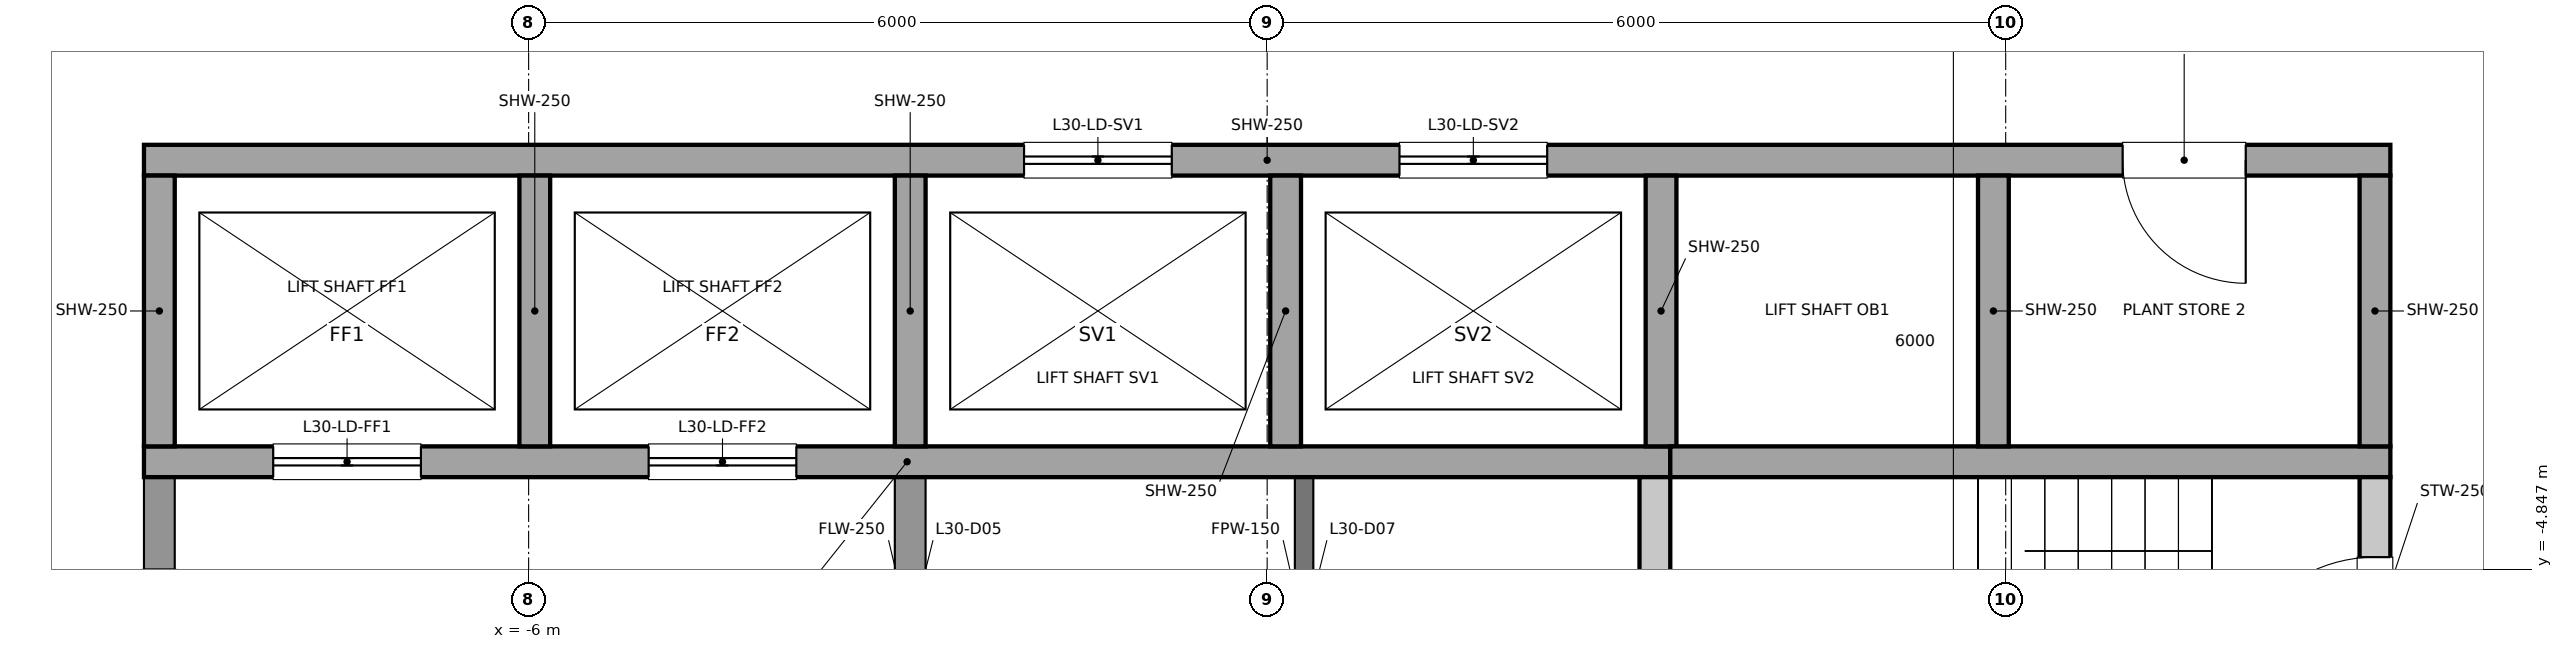
"""IFC4 building model, lengths in metres.
Left out: names, types, materials, properties, quantities, classifications, styles, units other than length and angle.
Written with IfcOpenShell. Run it as: python <this file> out.ifc"""

import sys

from ifc_helpers import new_model, si_unit, direction, frame, frame_2d, origin, place, context, subcontext, project, spatial, rectangle, extrude, element, fill, save


model = new_model("IFC4")
c1 = context("Model", 3, precision=1e-05, world=origin(), true_north=direction((0.0, 1.0)))
c2 = subcontext(c1, "Body", "Model", "MODEL_VIEW")
j1 = project(units=[si_unit("LENGTHUNIT", "METRE"), si_unit("PLANEANGLEUNIT", "RADIAN")], contexts=[c1])
p1 = place(None, origin())
s1 = spatial("IfcSite", under=j1, at=p1, CompositionType="ELEMENT")
p2 = place(p1, origin())
s2 = spatial("IfcBuilding", under=s1, at=p2, CompositionType="ELEMENT")
p3 = place(p2, frame((0.0, 0.0, 148.2)))
s3 = spatial("IfcBuildingStorey", under=s2, at=p3, CompositionType="ELEMENT", Elevation=148.2)
p4 = place(p3, frame((0.3, -6.6, 0.0), z_axis=(0.0, 0.0, 1.0), x_axis=(0.0, 1.0, 0.0)))
e1 = element("IfcWall", 1, at=p4, inside=s3, PredefinedType="PARTITIONING", context=c2, shape_type="SweptSolid", body=[
    extrude(rectangle(XDim=2.5, YDim=0.15, at=frame_2d((1.25, 0.0))), origin(), (0.0, 0.0, 1.0), 5.25),
])
p5 = place(p4, frame((0.8, 0.0, 0.0)))
e2 = element("IfcOpeningElement", 2, at=p5, cuts=e1, PredefinedType="OPENING", context=c2, shape_type="SweptSolid", body=[
    extrude(rectangle(XDim=0.9, YDim=2.1, at=frame_2d((0.45, 1.05))), frame((0.0, 0.075, 0.0), z_axis=(0.0, -1.0, 0.0), x_axis=(1.0, 0.0, 0.0)), (0.0, 0.0, 1.0), 0.15),
])
p6 = place(p3, frame((9.0, -6.6, 0.0), z_axis=(0.0, 0.0, 1.0), x_axis=(0.0, 1.0, 0.0)))
e3 = element("IfcWall", 3, at=p6, inside=s3, PredefinedType="SOLIDWALL", context=c2, shape_type="SweptSolid", body=[
    extrude(rectangle(XDim=2.5, YDim=0.25, at=frame_2d((1.25, 0.0))), origin(), (0.0, 0.0, 1.0), 5.25),
])
p7 = place(p6, frame((0.65, 0.0, 0.0)))
e4 = element("IfcOpeningElement", 4, at=p7, cuts=e3, PredefinedType="OPENING", context=c2, shape_type="SweptSolid", body=[
    extrude(rectangle(XDim=1.2, YDim=2.1, at=frame_2d((0.6, 1.05))), frame((0.0, 0.125, 0.0), z_axis=(0.0, -1.0, 0.0), x_axis=(1.0, 0.0, 0.0)), (0.0, 0.0, 1.0), 0.25),
])
p8 = place(p3, frame((-9.0, -6.6, 0.0), z_axis=(0.0, 0.0, 1.0), x_axis=(0.0, 1.0, 0.0)))
e5 = element("IfcWall", 5, at=p8, inside=s3, PredefinedType="PARTITIONING", context=c2, shape_type="SweptSolid", body=[
    extrude(rectangle(XDim=2.5, YDim=0.25, at=frame_2d((1.25, 0.0))), origin(), (0.0, 0.0, 1.0), 5.25),
])
p9 = place(p8, frame((0.75, 0.0, 0.0)))
e6 = element("IfcOpeningElement", 6, at=p9, cuts=e5, PredefinedType="OPENING", context=c2, shape_type="SweptSolid", body=[
    extrude(rectangle(XDim=1.0, YDim=2.1, at=frame_2d((0.5, 1.05))), frame((0.0, 0.125, 0.0), z_axis=(0.0, -1.0, 0.0), x_axis=(1.0, 0.0, 0.0)), (0.0, 0.0, 1.0), 0.25),
])
p10 = place(p3, frame((3.15, -6.6, 0.0), z_axis=(0.0, 0.0, 1.0), x_axis=(0.0, 1.0, 0.0)))
e7 = element("IfcWall", 7, at=p10, inside=s3, PredefinedType="SOLIDWALL", context=c2, shape_type="SweptSolid", body=[
    extrude(rectangle(XDim=2.5, YDim=0.25, at=frame_2d((1.25, 0.0))), origin(), (0.0, 0.0, 1.0), 5.25),
])
p11 = place(p3, frame((-2.9, -6.6, 0.0), z_axis=(0.0, 0.0, 1.0), x_axis=(0.0, 1.0, 0.0)))
e8 = element("IfcWall", 8, at=p11, inside=s3, PredefinedType="PARTITIONING", context=c2, shape_type="SweptSolid", body=[
    extrude(rectangle(XDim=2.5, YDim=0.25, at=frame_2d((1.25, 0.0))), origin(), (0.0, 0.0, 1.0), 5.25),
])
p12 = place(p11, frame((0.8, 0.0, 0.0)))
e9 = element("IfcOpeningElement", 9, at=p12, cuts=e8, PredefinedType="OPENING", context=c2, shape_type="SweptSolid", body=[
    extrude(rectangle(XDim=0.9, YDim=2.1, at=frame_2d((0.45, 1.05))), frame((0.0, 0.125, 0.0), z_axis=(0.0, -1.0, 0.0), x_axis=(1.0, 0.0, 0.0)), (0.0, 0.0, 1.0), 0.25),
])
p13 = place(p3, frame((-9.125, -1.525, 0.0), z_axis=(0.0, 0.0, 1.0), x_axis=(1.0, 0.0, 0.0)))
e10 = element("IfcWall", 10, at=p13, inside=s3, PredefinedType="SOLIDWALL", context=c2, shape_type="SweptSolid", body=[
    extrude(rectangle(XDim=18.25, YDim=0.25, at=frame_2d((9.125, 0.0))), origin(), (0.0, 0.0, 1.0), 5.25),
])
p14 = place(p13, frame((7.15, 0.0, 0.0)))
e11 = element("IfcOpeningElement", 11, at=p14, cuts=e10, PredefinedType="OPENING", context=c2, shape_type="SweptSolid", body=[
    extrude(rectangle(XDim=1.2, YDim=2.1, at=frame_2d((0.6, 1.05))), frame((0.0, 0.125, 0.0), z_axis=(0.0, -1.0, 0.0), x_axis=(1.0, 0.0, 0.0)), (0.0, 0.0, 1.0), 0.25),
])
p15 = place(p13, frame((10.2, 0.0, 0.0)))
e12 = element("IfcOpeningElement", 12, at=p15, cuts=e10, PredefinedType="OPENING", context=c2, shape_type="SweptSolid", body=[
    extrude(rectangle(XDim=1.2, YDim=2.1, at=frame_2d((0.6, 1.05))), frame((0.0, 0.125, 0.0), z_axis=(0.0, -1.0, 0.0), x_axis=(1.0, 0.0, 0.0)), (0.0, 0.0, 1.0), 0.25),
])
p16 = place(p13, frame((16.075, 0.0, 0.0)))
e13 = element("IfcOpeningElement", 13, at=p16, cuts=e10, PredefinedType="OPENING", context=c2, shape_type="SweptSolid", body=[
    extrude(rectangle(XDim=1.0, YDim=2.1, at=frame_2d((0.5, 1.05))), frame((0.0, 0.125, 0.0), z_axis=(0.0, -1.0, 0.0), x_axis=(1.0, 0.0, 0.0)), (0.0, 0.0, 1.0), 0.25),
])
p17 = place(p3, frame((-9.125, -3.975, 0.0), z_axis=(0.0, 0.0, 1.0), x_axis=(1.0, 0.0, 0.0)))
e14 = element("IfcWall", 14, at=p17, inside=s3, PredefinedType="SOLIDWALL", context=c2, shape_type="SweptSolid", body=[
    extrude(rectangle(XDim=12.4, YDim=0.25, at=frame_2d((6.2, 0.0))), origin(), (0.0, 0.0, 1.0), 5.25),
])
p18 = place(p17, frame((1.05, 0.0, 0.0)))
e15 = element("IfcOpeningElement", 15, at=p18, cuts=e14, PredefinedType="OPENING", context=c2, shape_type="SweptSolid", body=[
    extrude(rectangle(XDim=1.2, YDim=2.1, at=frame_2d((0.6, 1.05))), frame((0.0, 0.125, 0.0), z_axis=(0.0, -1.0, 0.0), x_axis=(1.0, 0.0, 0.0)), (0.0, 0.0, 1.0), 0.25),
])
p19 = place(p17, frame((4.1, 0.0, 0.0)))
e16 = element("IfcOpeningElement", 16, at=p19, cuts=e14, PredefinedType="OPENING", context=c2, shape_type="SweptSolid", body=[
    extrude(rectangle(XDim=1.2, YDim=2.1, at=frame_2d((0.6, 1.05))), frame((0.0, 0.125, 0.0), z_axis=(0.0, -1.0, 0.0), x_axis=(1.0, 0.0, 0.0)), (0.0, 0.0, 1.0), 0.25),
])
p20 = place(p3, frame((3.275, -3.975, 0.0), z_axis=(0.0, 0.0, 1.0), x_axis=(1.0, 0.0, 0.0)))
e17 = element("IfcWall", 17, at=p20, inside=s3, PredefinedType="SOLIDWALL", context=c2, shape_type="SweptSolid", body=[
    extrude(rectangle(XDim=5.85, YDim=0.25, at=frame_2d((2.925, 0.0))), origin(), (0.0, 0.0, 1.0), 5.25),
])
for number, where, z_axis, x_axis in (
    (18, (-9.0, -3.85, 0.0), (0.0, 0.0, 1.0), (0.0, 1.0, 0.0)),
    (19, (-5.95, -3.85, 0.0), (0.0, 0.0, 1.0), (0.0, 1.0, 0.0)),
    (20, (-2.9, -3.85, 0.0), (0.0, 0.0, 1.0), (0.0, 1.0, 0.0)),
    (21, (0.15, -3.85, 0.0), (0.0, 0.0, 1.0), (0.0, 1.0, 0.0)),
    (22, (3.2, -3.85, 0.0), (0.0, 0.0, 1.0), (0.0, 1.0, 0.0)),
    (23, (5.9, -3.85, 0.0), (0.0, 0.0, 1.0), (0.0, 1.0, 0.0)),
    (24, (9.0, -3.85, 0.0), (0.0, 0.0, 1.0), (0.0, 1.0, 0.0)),
):
    element("IfcWall", number, at=place(p3, frame(where, z_axis=z_axis, x_axis=x_axis)), inside=s3, PredefinedType="SOLIDWALL", context=c2, shape_type="SweptSolid", body=[
        extrude(rectangle(XDim=2.2, YDim=0.25, at=frame_2d((1.1, 0.0))), origin(), (0.0, 0.0, 1.0), 5.25),
    ])
p21 = place(p18, origin())
e25 = element("IfcDoor", 25, at=p21, inside=s3, OperationType="DOUBLE_DOOR_SLIDING", PredefinedType="DOOR", context=c2, shape_type="SweptSolid", body=[
    extrude(rectangle(XDim=1.2, YDim=2.1, at=frame_2d((0.6, 1.05))), frame((0.0, 0.025, 0.0), z_axis=(0.0, -1.0, 0.0), x_axis=(1.0, 0.0, 0.0)), (0.0, 0.0, 1.0), 0.05),
])
fill(e15, e25)
p22 = place(p19, origin())
e26 = element("IfcDoor", 26, at=p22, inside=s3, OperationType="DOUBLE_DOOR_SLIDING", PredefinedType="DOOR", context=c2, shape_type="SweptSolid", body=[
    extrude(rectangle(XDim=1.2, YDim=2.1, at=frame_2d((0.6, 1.05))), frame((0.0, 0.025, 0.0), z_axis=(0.0, -1.0, 0.0), x_axis=(1.0, 0.0, 0.0)), (0.0, 0.0, 1.0), 0.05),
])
fill(e16, e26)
p23 = place(p14, origin())
e27 = element("IfcDoor", 27, at=p23, inside=s3, OperationType="DOUBLE_DOOR_SLIDING", PredefinedType="DOOR", context=c2, shape_type="SweptSolid", body=[
    extrude(rectangle(XDim=1.2, YDim=2.1, at=frame_2d((0.6, 1.05))), frame((0.0, 0.025, 0.0), z_axis=(0.0, -1.0, 0.0), x_axis=(1.0, 0.0, 0.0)), (0.0, 0.0, 1.0), 0.05),
])
fill(e11, e27)
p24 = place(p15, origin())
e28 = element("IfcDoor", 28, at=p24, inside=s3, OperationType="DOUBLE_DOOR_SLIDING", PredefinedType="DOOR", context=c2, shape_type="SweptSolid", body=[
    extrude(rectangle(XDim=1.2, YDim=2.1, at=frame_2d((0.6, 1.05))), frame((0.0, 0.025, 0.0), z_axis=(0.0, -1.0, 0.0), x_axis=(1.0, 0.0, 0.0)), (0.0, 0.0, 1.0), 0.05),
])
fill(e12, e28)
p25 = place(p7, origin())
e29 = element("IfcDoor", 29, at=p25, inside=s3, OperationType="SINGLE_SWING_LEFT", PredefinedType="DOOR", context=c2, shape_type="SweptSolid", body=[
    extrude(rectangle(XDim=1.2, YDim=2.1, at=frame_2d((0.6, 1.05))), frame((0.0, 0.025, 0.0), z_axis=(0.0, -1.0, 0.0), x_axis=(1.0, 0.0, 0.0)), (0.0, 0.0, 1.0), 0.05),
])
fill(e4, e29)
p26 = place(p16, origin())
e30 = element("IfcDoor", 30, at=p26, inside=s3, OperationType="SINGLE_SWING_RIGHT", PredefinedType="DOOR", context=c2, shape_type="SweptSolid", body=[
    extrude(rectangle(XDim=1.0, YDim=2.1, at=frame_2d((0.5, 1.05))), frame((0.0, 0.025, 0.0), z_axis=(0.0, -1.0, 0.0), x_axis=(1.0, 0.0, 0.0)), (0.0, 0.0, 1.0), 0.05),
])
fill(e13, e30)
save(model, sys.argv[1])
